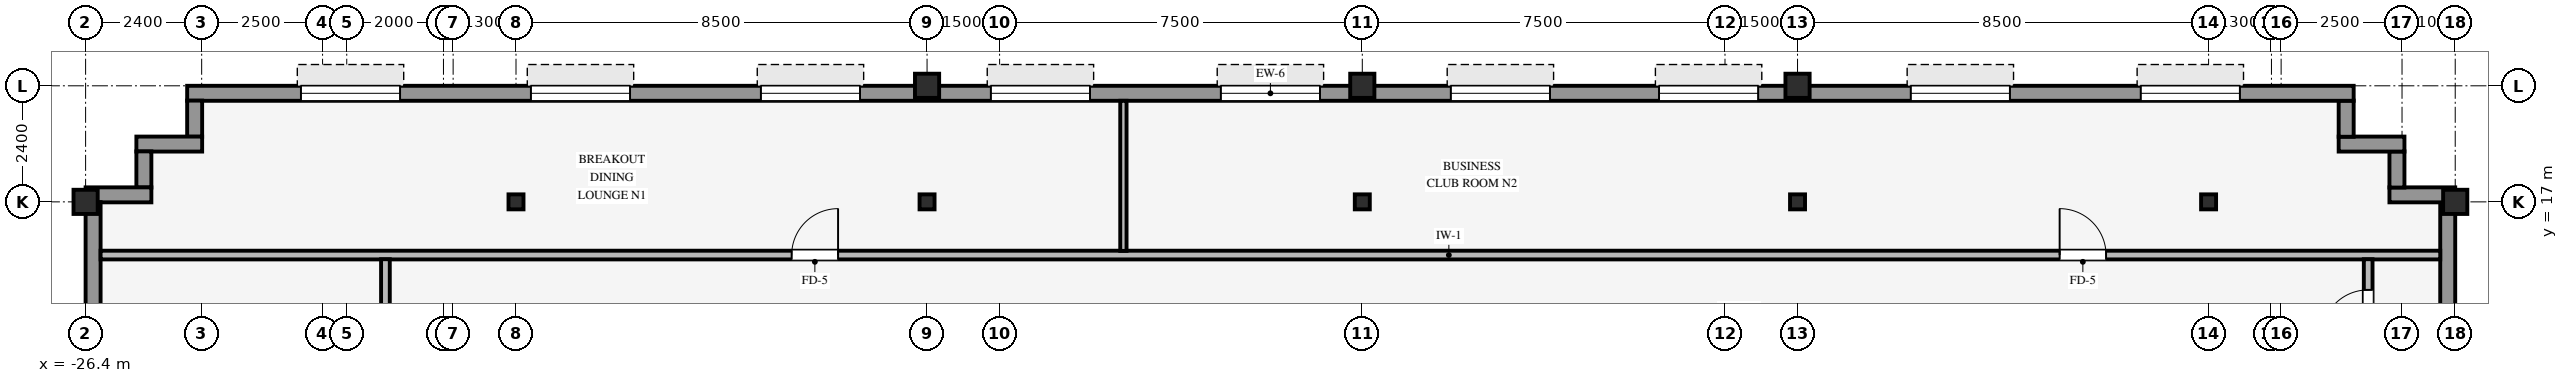
"""IFC4 building model, lengths in metres.
Left out: names, types, materials, properties, quantities, classifications, styles, units other than length and angle.
Written with IfcOpenShell. Run it as: python <this file> out.ifc"""

import sys

from ifc_helpers import new_model, si_unit, direction, frame, frame_2d, origin, origin_2d, place, context, subcontext, project, spatial, rectangle, hollow_rectangle, i_section, extrude, source, transform, mapped, element, fill, save


model = new_model("IFC4")
c1 = context("Model", 3, precision=1e-05, world=origin(), true_north=direction((0.0, 1.0)))
c2 = subcontext(c1, "Body", "Model", "MODEL_VIEW")
j1 = project(units=[si_unit("LENGTHUNIT", "METRE"), si_unit("PLANEANGLEUNIT", "RADIAN")], contexts=[c1])
p1 = place(None, origin())
s1 = spatial("IfcSite", under=j1, at=p1, CompositionType="ELEMENT")
p2 = place(p1, origin())
s2 = spatial("IfcBuilding", under=s1, at=p2, CompositionType="ELEMENT")
p3 = place(p2, frame((0.0, 0.0, 194.55)))
s3 = spatial("IfcBuildingStorey", under=s2, at=p3, CompositionType="ELEMENT", Elevation=194.55)
for number, where, z_axis, x_axis in (
    (1, (-26.4, 17.0, 0.0), (0.0, 0.0, 1.0), (1.0, 0.0, 0.0)),
    (2, (22.6, 17.0, 0.0), (0.0, 0.0, 1.0), (1.0, 0.0, 0.0)),
    (3, (-9.0, 19.4, 0.0), (0.0, 0.0, 1.0), (1.0, 0.0, 0.0)),
    (4, (0.0, 19.4, 0.0), (0.0, 0.0, 1.0), (1.0, 0.0, 0.0)),
    (5, (9.0, 19.4, 0.0), (0.0, 0.0, 1.0), (1.0, 0.0, 0.0)),
):
    element("IfcColumn", number, at=place(p3, frame(where, z_axis=z_axis, x_axis=x_axis)), inside=s3, PredefinedType="COLUMN", context=c2, shape_type="SweptSolid", body=[
        extrude(hollow_rectangle(XDim=0.5, YDim=0.5, WallThickness=0.032, InnerFilletRadius=0.032, OuterFilletRadius=0.064, at=origin_2d()), origin(), (0.0, 0.0, 1.0), 3.37),
    ])
for number, where, z_axis, x_axis in (
    (6, (0.0, 17.0, 0.0), (0.0, 0.0, 1.0), (1.0, 0.0, 0.0)),
    (7, (-17.5, 17.0, 0.0), (0.0, 0.0, 1.0), (1.0, 0.0, 0.0)),
    (8, (-9.0, 17.0, 0.0), (0.0, 0.0, 1.0), (1.0, 0.0, 0.0)),
    (9, (9.0, 17.0, 0.0), (0.0, 0.0, 1.0), (1.0, 0.0, 0.0)),
    (10, (17.5, 17.0, 0.0), (0.0, 0.0, 1.0), (1.0, 0.0, 0.0)),
):
    element("IfcColumn", number, at=place(p3, frame(where, z_axis=z_axis, x_axis=x_axis)), inside=s3, PredefinedType="COLUMN", context=c2, shape_type="SweptSolid", body=[
        extrude(i_section(OverallWidth=0.31, OverallDepth=0.31, WebThickness=0.015, FlangeThickness=0.015, FilletRadius=0.015, at=origin_2d()), origin(), (0.0, 0.0, 1.0), 3.37),
    ])
p4 = place(p3, frame((22.445, -20.794, 0.0), z_axis=(0.0, 0.0, 1.0), x_axis=(0.0, 1.0, 0.0)))
e11 = element("IfcWall", 11, at=p4, inside=s3, PredefinedType="STANDARD", context=c2, shape_type="SweptSolid", body=[
    extrude(rectangle(XDim=37.788, YDim=0.31, at=frame_2d((18.894, 0.0))), origin(), (0.0, 0.0, 1.0), 2.705),
])
p5 = place(p4, frame((16.474, 0.0, 0.0), z_axis=(0.0, 0.0, 1.0), x_axis=(-1.0, 0.0, 0.0)))
e12 = element("IfcOpeningElement", 12, at=p5, cuts=e11, PredefinedType="OPENING", context=c2, shape_type="SweptSolid", body=[
    extrude(rectangle(XDim=0.98, YDim=2.15, at=frame_2d((0.49, 1.075))), frame((0.0, 0.165, 0.0), z_axis=(0.0, -1.0, 0.0), x_axis=(1.0, 0.0, 0.0)), (0.0, 0.0, 1.0), 0.33),
])
p6 = place(p4, frame((1.581, 0.0, 0.8)))
e13 = element("IfcOpeningElement", 13, at=p6, cuts=e11, PredefinedType="OPENING", context=c2, shape_type="SweptSolid", body=[
    extrude(rectangle(XDim=1.25, YDim=1.52, at=frame_2d((0.625, 0.76))), frame((0.0, 0.165, 0.0), z_axis=(0.0, -1.0, 0.0), x_axis=(1.0, 0.0, 0.0)), (0.0, 0.0, 1.0), 0.33),
])
p7 = place(p4, frame((8.044, 0.0, 0.8)))
e14 = element("IfcOpeningElement", 14, at=p7, cuts=e11, PredefinedType="OPENING", context=c2, shape_type="SweptSolid", body=[
    extrude(rectangle(XDim=1.25, YDim=1.52, at=frame_2d((0.625, 0.76))), frame((0.0, 0.165, 0.0), z_axis=(0.0, -1.0, 0.0), x_axis=(1.0, 0.0, 0.0)), (0.0, 0.0, 1.0), 0.33),
])
p8 = place(p4, frame((13.156, 0.0, 0.8)))
e15 = element("IfcOpeningElement", 15, at=p8, cuts=e11, PredefinedType="OPENING", context=c2, shape_type="SweptSolid", body=[
    extrude(rectangle(XDim=1.25, YDim=1.52, at=frame_2d((0.625, 0.76))), frame((0.0, 0.165, 0.0), z_axis=(0.0, -1.0, 0.0), x_axis=(1.0, 0.0, 0.0)), (0.0, 0.0, 1.0), 0.33),
])
p9 = place(p4, frame((18.269, 0.0, 0.8)))
e16 = element("IfcOpeningElement", 16, at=p9, cuts=e11, PredefinedType="OPENING", context=c2, shape_type="SweptSolid", body=[
    extrude(rectangle(XDim=1.25, YDim=1.52, at=frame_2d((0.625, 0.76))), frame((0.0, 0.165, 0.0), z_axis=(0.0, -1.0, 0.0), x_axis=(1.0, 0.0, 0.0)), (0.0, 0.0, 1.0), 0.33),
])
p10 = place(p4, frame((22.482, 0.0, 0.8)))
e17 = element("IfcOpeningElement", 17, at=p10, cuts=e11, PredefinedType="OPENING", context=c2, shape_type="SweptSolid", body=[
    extrude(rectangle(XDim=1.25, YDim=1.52, at=frame_2d((0.625, 0.76))), frame((0.0, 0.165, 0.0), z_axis=(0.0, -1.0, 0.0), x_axis=(1.0, 0.0, 0.0)), (0.0, 0.0, 1.0), 0.33),
])
p11 = place(p4, frame((28.044, 0.0, 0.8)))
e18 = element("IfcOpeningElement", 18, at=p11, cuts=e11, PredefinedType="OPENING", context=c2, shape_type="SweptSolid", body=[
    extrude(rectangle(XDim=1.25, YDim=1.52, at=frame_2d((0.625, 0.76))), frame((0.0, 0.165, 0.0), z_axis=(0.0, -1.0, 0.0), x_axis=(1.0, 0.0, 0.0)), (0.0, 0.0, 1.0), 0.33),
])
p12 = place(p4, frame((33.607, 0.0, 0.8)))
e19 = element("IfcOpeningElement", 19, at=p12, cuts=e11, PredefinedType="OPENING", context=c2, shape_type="SweptSolid", body=[
    extrude(rectangle(XDim=1.25, YDim=1.52, at=frame_2d((0.625, 0.76))), frame((0.0, 0.165, 0.0), z_axis=(0.0, -1.0, 0.0), x_axis=(1.0, 0.0, 0.0)), (0.0, 0.0, 1.0), 0.33),
])
p13 = place(p3, frame((21.24, 17.145, 0.0), z_axis=(0.0, 0.0, 1.0), x_axis=(1.0, 0.0, 0.0)))
e20 = element("IfcWall", 20, at=p13, inside=s3, PredefinedType="STANDARD", context=c2, shape_type="SweptSolid", body=[
    extrude(rectangle(XDim=1.36, YDim=0.31, at=frame_2d((0.68, 0.0))), origin(), (0.0, 0.0, 1.0), 2.816),
])
p14 = place(p3, frame((21.395, 17.296, 0.0), z_axis=(0.0, 0.0, 1.0), x_axis=(0.0, 1.0, 0.0)))
e21 = element("IfcWall", 21, at=p14, inside=s3, PredefinedType="STANDARD", context=c2, shape_type="SweptSolid", body=[
    extrude(rectangle(XDim=0.748, YDim=0.31, at=frame_2d((0.374, 0.0))), origin(), (0.0, 0.0, 1.0), 2.816),
])
p15 = place(p3, frame((20.19, 18.195, 0.0), z_axis=(0.0, 0.0, 1.0), x_axis=(1.0, 0.0, 0.0)))
e22 = element("IfcWall", 22, at=p15, inside=s3, PredefinedType="STANDARD", context=c2, shape_type="SweptSolid", body=[
    extrude(rectangle(XDim=1.36, YDim=0.31, at=frame_2d((0.68, 0.0))), origin(), (0.0, 0.0, 1.0), 2.816),
])
p16 = place(p3, frame((20.345, 18.346, 0.0), z_axis=(0.0, 0.0, 1.0), x_axis=(0.0, 1.0, 0.0)))
e23 = element("IfcWall", 23, at=p16, inside=s3, PredefinedType="STANDARD", context=c2, shape_type="SweptSolid", body=[
    extrude(rectangle(XDim=0.748, YDim=0.31, at=frame_2d((0.374, 0.0))), origin(), (0.0, 0.0, 1.0), 2.816),
])
p17 = place(p3, frame((-24.3, 19.245, 0.0), z_axis=(0.0, 0.0, 1.0), x_axis=(1.0, 0.0, 0.0)))
e24 = element("IfcWall", 24, at=p17, inside=s3, PredefinedType="STANDARD", context=c2, shape_type="SweptSolid", body=[
    extrude(rectangle(XDim=44.8, YDim=0.31, at=frame_2d((22.4, 0.0))), origin(), (0.0, 0.0, 1.0), 2.705),
])
p18 = place(p17, frame((2.353, 0.0, 0.8)))
e25 = element("IfcOpeningElement", 25, at=p18, cuts=e24, PredefinedType="OPENING", context=c2, shape_type="SweptSolid", body=[
    extrude(rectangle(XDim=2.05, YDim=1.52, at=frame_2d((1.025, 0.76))), frame((0.0, 0.165, 0.0), z_axis=(0.0, -1.0, 0.0), x_axis=(1.0, 0.0, 0.0)), (0.0, 0.0, 1.0), 0.33),
])
p19 = place(p17, frame((7.108, 0.0, 0.8)))
e26 = element("IfcOpeningElement", 26, at=p19, cuts=e24, PredefinedType="OPENING", context=c2, shape_type="SweptSolid", body=[
    extrude(rectangle(XDim=2.05, YDim=1.52, at=frame_2d((1.025, 0.76))), frame((0.0, 0.165, 0.0), z_axis=(0.0, -1.0, 0.0), x_axis=(1.0, 0.0, 0.0)), (0.0, 0.0, 1.0), 0.33),
])
p20 = place(p17, frame((11.864, 0.0, 0.8)))
e27 = element("IfcOpeningElement", 27, at=p20, cuts=e24, PredefinedType="OPENING", context=c2, shape_type="SweptSolid", body=[
    extrude(rectangle(XDim=2.05, YDim=1.52, at=frame_2d((1.025, 0.76))), frame((0.0, 0.165, 0.0), z_axis=(0.0, -1.0, 0.0), x_axis=(1.0, 0.0, 0.0)), (0.0, 0.0, 1.0), 0.33),
])
p21 = place(p17, frame((16.619, 0.0, 0.8)))
e28 = element("IfcOpeningElement", 28, at=p21, cuts=e24, PredefinedType="OPENING", context=c2, shape_type="SweptSolid", body=[
    extrude(rectangle(XDim=2.05, YDim=1.52, at=frame_2d((1.025, 0.76))), frame((0.0, 0.165, 0.0), z_axis=(0.0, -1.0, 0.0), x_axis=(1.0, 0.0, 0.0)), (0.0, 0.0, 1.0), 0.33),
])
p22 = place(p17, frame((21.375, 0.0, 0.8)))
e29 = element("IfcOpeningElement", 29, at=p22, cuts=e24, PredefinedType="OPENING", context=c2, shape_type="SweptSolid", body=[
    extrude(rectangle(XDim=2.05, YDim=1.52, at=frame_2d((1.025, 0.76))), frame((0.0, 0.165, 0.0), z_axis=(0.0, -1.0, 0.0), x_axis=(1.0, 0.0, 0.0)), (0.0, 0.0, 1.0), 0.33),
])
p23 = place(p17, frame((26.131, 0.0, 0.8)))
e30 = element("IfcOpeningElement", 30, at=p23, cuts=e24, PredefinedType="OPENING", context=c2, shape_type="SweptSolid", body=[
    extrude(rectangle(XDim=2.05, YDim=1.52, at=frame_2d((1.025, 0.76))), frame((0.0, 0.165, 0.0), z_axis=(0.0, -1.0, 0.0), x_axis=(1.0, 0.0, 0.0)), (0.0, 0.0, 1.0), 0.33),
])
p24 = place(p17, frame((30.436, 0.0, 0.8)))
e31 = element("IfcOpeningElement", 31, at=p24, cuts=e24, PredefinedType="OPENING", context=c2, shape_type="SweptSolid", body=[
    extrude(rectangle(XDim=2.05, YDim=1.52, at=frame_2d((1.025, 0.76))), frame((0.0, 0.165, 0.0), z_axis=(0.0, -1.0, 0.0), x_axis=(1.0, 0.0, 0.0)), (0.0, 0.0, 1.0), 0.33),
])
p25 = place(p17, frame((35.642, 0.0, 0.8)))
e32 = element("IfcOpeningElement", 32, at=p25, cuts=e24, PredefinedType="OPENING", context=c2, shape_type="SweptSolid", body=[
    extrude(rectangle(XDim=2.05, YDim=1.52, at=frame_2d((1.025, 0.76))), frame((0.0, 0.165, 0.0), z_axis=(0.0, -1.0, 0.0), x_axis=(1.0, 0.0, 0.0)), (0.0, 0.0, 1.0), 0.33),
])
p26 = place(p17, frame((40.397, 0.0, 0.8)))
e33 = element("IfcOpeningElement", 33, at=p26, cuts=e24, PredefinedType="OPENING", context=c2, shape_type="SweptSolid", body=[
    extrude(rectangle(XDim=2.05, YDim=1.52, at=frame_2d((1.025, 0.76))), frame((0.0, 0.165, 0.0), z_axis=(0.0, -1.0, 0.0), x_axis=(1.0, 0.0, 0.0)), (0.0, 0.0, 1.0), 0.33),
])
p27 = place(p3, frame((-24.145, 18.346, 0.0), z_axis=(0.0, 0.0, 1.0), x_axis=(0.0, 1.0, 0.0)))
e34 = element("IfcWall", 34, at=p27, inside=s3, PredefinedType="STANDARD", context=c2, shape_type="SweptSolid", body=[
    extrude(rectangle(XDim=0.748, YDim=0.31, at=frame_2d((0.374, 0.0))), origin(), (0.0, 0.0, 1.0), 2.816),
])
p28 = place(p3, frame((-25.35, 18.195, 0.0), z_axis=(0.0, 0.0, 1.0), x_axis=(1.0, 0.0, 0.0)))
e35 = element("IfcWall", 35, at=p28, inside=s3, PredefinedType="STANDARD", context=c2, shape_type="SweptSolid", body=[
    extrude(rectangle(XDim=1.36, YDim=0.31, at=frame_2d((0.68, 0.0))), origin(), (0.0, 0.0, 1.0), 2.816),
])
p29 = place(p3, frame((-25.195, 17.296, 0.0), z_axis=(0.0, 0.0, 1.0), x_axis=(0.0, 1.0, 0.0)))
e36 = element("IfcWall", 36, at=p29, inside=s3, PredefinedType="STANDARD", context=c2, shape_type="SweptSolid", body=[
    extrude(rectangle(XDim=0.748, YDim=0.31, at=frame_2d((0.374, 0.0))), origin(), (0.0, 0.0, 1.0), 2.816),
])
p30 = place(p3, frame((-26.4, 17.145, 0.0), z_axis=(0.0, 0.0, 1.0), x_axis=(1.0, 0.0, 0.0)))
e37 = element("IfcWall", 37, at=p30, inside=s3, PredefinedType="STANDARD", context=c2, shape_type="SweptSolid", body=[
    extrude(rectangle(XDim=1.36, YDim=0.31, at=frame_2d((0.68, 0.0))), origin(), (0.0, 0.0, 1.0), 2.816),
])
p31 = place(p3, frame((-26.245, -20.794, 0.0), z_axis=(0.0, 0.0, 1.0), x_axis=(0.0, 1.0, 0.0)))
e38 = element("IfcWall", 38, at=p31, inside=s3, PredefinedType="STANDARD", context=c2, shape_type="SweptSolid", body=[
    extrude(rectangle(XDim=37.788, YDim=0.31, at=frame_2d((18.894, 0.0))), origin(), (0.0, 0.0, 1.0), 2.705),
])
p32 = place(p31, frame((24.744, 0.0, 0.0)))
e39 = element("IfcOpeningElement", 39, at=p32, cuts=e38, PredefinedType="OPENING", context=c2, shape_type="SweptSolid", body=[
    extrude(rectangle(XDim=1.05, YDim=2.1, at=frame_2d((0.525, 1.05))), frame((0.0, 0.165, 0.0), z_axis=(0.0, -1.0, 0.0), x_axis=(1.0, 0.0, 0.0)), (0.0, 0.0, 1.0), 0.33),
])
p33 = place(p31, frame((1.581, 0.0, 0.8)))
e40 = element("IfcOpeningElement", 40, at=p33, cuts=e38, PredefinedType="OPENING", context=c2, shape_type="SweptSolid", body=[
    extrude(rectangle(XDim=1.25, YDim=1.52, at=frame_2d((0.625, 0.76))), frame((0.0, 0.165, 0.0), z_axis=(0.0, -1.0, 0.0), x_axis=(1.0, 0.0, 0.0)), (0.0, 0.0, 1.0), 0.33),
])
p34 = place(p31, frame((8.044, 0.0, 0.8)))
e41 = element("IfcOpeningElement", 41, at=p34, cuts=e38, PredefinedType="OPENING", context=c2, shape_type="SweptSolid", body=[
    extrude(rectangle(XDim=1.25, YDim=1.52, at=frame_2d((0.625, 0.76))), frame((0.0, 0.165, 0.0), z_axis=(0.0, -1.0, 0.0), x_axis=(1.0, 0.0, 0.0)), (0.0, 0.0, 1.0), 0.33),
])
p35 = place(p31, frame((13.156, 0.0, 0.8)))
e42 = element("IfcOpeningElement", 42, at=p35, cuts=e38, PredefinedType="OPENING", context=c2, shape_type="SweptSolid", body=[
    extrude(rectangle(XDim=1.25, YDim=1.52, at=frame_2d((0.625, 0.76))), frame((0.0, 0.165, 0.0), z_axis=(0.0, -1.0, 0.0), x_axis=(1.0, 0.0, 0.0)), (0.0, 0.0, 1.0), 0.33),
])
p36 = place(p31, frame((18.269, 0.0, 0.8)))
e43 = element("IfcOpeningElement", 43, at=p36, cuts=e38, PredefinedType="OPENING", context=c2, shape_type="SweptSolid", body=[
    extrude(rectangle(XDim=1.25, YDim=1.52, at=frame_2d((0.625, 0.76))), frame((0.0, 0.165, 0.0), z_axis=(0.0, -1.0, 0.0), x_axis=(1.0, 0.0, 0.0)), (0.0, 0.0, 1.0), 0.33),
])
p37 = place(p31, frame((22.932, 0.0, 0.8)))
e44 = element("IfcOpeningElement", 44, at=p37, cuts=e38, PredefinedType="OPENING", context=c2, shape_type="SweptSolid", body=[
    extrude(rectangle(XDim=1.25, YDim=1.52, at=frame_2d((0.625, 0.76))), frame((0.0, 0.165, 0.0), z_axis=(0.0, -1.0, 0.0), x_axis=(1.0, 0.0, 0.0)), (0.0, 0.0, 1.0), 0.33),
])
p38 = place(p31, frame((28.044, 0.0, 0.8)))
e45 = element("IfcOpeningElement", 45, at=p38, cuts=e38, PredefinedType="OPENING", context=c2, shape_type="SweptSolid", body=[
    extrude(rectangle(XDim=1.25, YDim=1.52, at=frame_2d((0.625, 0.76))), frame((0.0, 0.165, 0.0), z_axis=(0.0, -1.0, 0.0), x_axis=(1.0, 0.0, 0.0)), (0.0, 0.0, 1.0), 0.33),
])
p39 = place(p31, frame((33.607, 0.0, 0.8)))
e46 = element("IfcOpeningElement", 46, at=p39, cuts=e38, PredefinedType="OPENING", context=c2, shape_type="SweptSolid", body=[
    extrude(rectangle(XDim=1.25, YDim=1.52, at=frame_2d((0.625, 0.76))), frame((0.0, 0.165, 0.0), z_axis=(0.0, -1.0, 0.0), x_axis=(1.0, 0.0, 0.0)), (0.0, 0.0, 1.0), 0.33),
])
p40 = place(p3, frame((-26.09, 15.9, 0.0), z_axis=(0.0, 0.0, 1.0), x_axis=(1.0, 0.0, 0.0)))
e47 = element("IfcWall", 47, at=p40, inside=s3, PredefinedType="PARTITIONING", context=c2, shape_type="SweptSolid", body=[
    extrude(rectangle(XDim=48.38, YDim=0.18, at=frame_2d((24.19, 0.0))), origin(), (0.0, 0.0, 1.0), 3.36),
])
p41 = place(p40, frame((14.29, 0.0, 0.0)))
e48 = element("IfcOpeningElement", 48, at=p41, cuts=e47, PredefinedType="OPENING", context=c2, shape_type="SweptSolid", body=[
    extrude(rectangle(XDim=0.96, YDim=2.1, at=frame_2d((0.48, 1.05))), frame((0.0, 0.1, 0.0), z_axis=(0.0, -1.0, 0.0), x_axis=(1.0, 0.0, 0.0)), (0.0, 0.0, 1.0), 0.2),
])
p42 = place(p40, frame((40.51, 0.0, 0.0)))
e49 = element("IfcOpeningElement", 49, at=p42, cuts=e47, PredefinedType="OPENING", context=c2, shape_type="SweptSolid", body=[
    extrude(rectangle(XDim=0.96, YDim=2.1, at=frame_2d((0.48, 1.05))), frame((0.0, 0.1, 0.0), z_axis=(0.0, -1.0, 0.0), x_axis=(1.0, 0.0, 0.0)), (0.0, 0.0, 1.0), 0.2),
])
p43 = place(p3, frame((-20.2, -15.814, 0.0), z_axis=(0.0, 0.0, 1.0), x_axis=(0.0, 1.0, 0.0)))
e50 = element("IfcWall", 50, at=p43, inside=s3, PredefinedType="PARTITIONING", context=c2, shape_type="SweptSolid", body=[
    extrude(rectangle(XDim=31.628, YDim=0.18, at=frame_2d((15.814, 0.0))), origin(), (0.0, 0.0, 1.0), 3.36),
])
p44 = place(p43, frame((15.334, 0.0, 0.0)))
e51 = element("IfcOpeningElement", 51, at=p44, cuts=e50, PredefinedType="OPENING", context=c2, shape_type="SweptSolid", body=[
    extrude(rectangle(XDim=0.96, YDim=2.1, at=frame_2d((0.48, 1.05))), frame((0.0, 0.1, 0.0), z_axis=(0.0, -1.0, 0.0), x_axis=(1.0, 0.0, 0.0)), (0.0, 0.0, 1.0), 0.2),
])
p45 = place(p43, frame((5.834, 0.0, 0.0)))
e52 = element("IfcOpeningElement", 52, at=p45, cuts=e50, PredefinedType="OPENING", context=c2, shape_type="SweptSolid", body=[
    extrude(rectangle(XDim=0.96, YDim=2.1, at=frame_2d((0.48, 1.05))), frame((0.0, 0.1, 0.0), z_axis=(0.0, -1.0, 0.0), x_axis=(1.0, 0.0, 0.0)), (0.0, 0.0, 1.0), 0.2),
])
p46 = place(p43, frame((24.834, 0.0, 0.0)))
e53 = element("IfcOpeningElement", 53, at=p46, cuts=e50, PredefinedType="OPENING", context=c2, shape_type="SweptSolid", body=[
    extrude(rectangle(XDim=0.96, YDim=2.1, at=frame_2d((0.48, 1.05))), frame((0.0, 0.1, 0.0), z_axis=(0.0, -1.0, 0.0), x_axis=(1.0, 0.0, 0.0)), (0.0, 0.0, 1.0), 0.2),
])
p47 = place(p3, frame((-4.94, 15.986, 0.0), z_axis=(0.0, 0.0, 1.0), x_axis=(0.0, 1.0, 0.0)))
e54 = element("IfcWall", 54, at=p47, inside=s3, PredefinedType="PARTITIONING", context=c2, shape_type="SweptSolid", body=[
    extrude(rectangle(XDim=3.104, YDim=0.13, at=frame_2d((1.552, 0.0))), origin(), (0.0, 0.0, 1.0), 3.36),
])
p48 = place(p3, frame((20.8, 13.586, 0.0), z_axis=(0.0, 0.0, 1.0), x_axis=(0.0, 1.0, 0.0)))
e55 = element("IfcWall", 55, at=p48, inside=s3, PredefinedType="PARTITIONING", context=c2, shape_type="SweptSolid", body=[
    extrude(rectangle(XDim=2.228, YDim=0.18, at=frame_2d((1.114, 0.0))), origin(), (0.0, 0.0, 1.0), 3.36),
])
p49 = place(p48, frame((0.634, 0.0, 0.0)))
e56 = element("IfcOpeningElement", 56, at=p49, cuts=e55, PredefinedType="OPENING", context=c2, shape_type="SweptSolid", body=[
    extrude(rectangle(XDim=0.96, YDim=2.1, at=frame_2d((0.48, 1.05))), frame((0.0, 0.1, 0.0), z_axis=(0.0, -1.0, 0.0), x_axis=(1.0, 0.0, 0.0)), (0.0, 0.0, 1.0), 0.2),
])
m1 = source(origin(), c2, "Body", "SweptSolid", [
    extrude(rectangle(XDim=2.05, YDim=1.52, at=frame_2d((1.025, 0.76))), frame((0.0, 0.03, 0.0), z_axis=(0.0, -1.0, 0.0), x_axis=(1.0, 0.0, 0.0)), (0.0, 0.0, 1.0), 0.06),
])
p50 = place(p18, origin())
e57 = element("IfcWindow", 57, at=p50, inside=s3, PartitioningType="SINGLE_PANEL", PredefinedType="WINDOW", context=c2, shape_type="MappedRepresentation", body=[
    mapped(m1, transform((0.0, 0.0, 0.0), scale=1.0)),
])
fill(e25, e57)
p51 = place(p19, origin())
e58 = element("IfcWindow", 58, at=p51, inside=s3, PartitioningType="SINGLE_PANEL", PredefinedType="WINDOW", context=c2, shape_type="MappedRepresentation", body=[
    mapped(m1, transform((0.0, 0.0, 0.0), scale=1.0)),
])
fill(e26, e58)
p52 = place(p20, origin())
e59 = element("IfcWindow", 59, at=p52, inside=s3, PartitioningType="SINGLE_PANEL", PredefinedType="WINDOW", context=c2, shape_type="MappedRepresentation", body=[
    mapped(m1, transform((0.0, 0.0, 0.0), scale=1.0)),
])
fill(e27, e59)
p53 = place(p21, origin())
e60 = element("IfcWindow", 60, at=p53, inside=s3, PartitioningType="SINGLE_PANEL", PredefinedType="WINDOW", context=c2, shape_type="MappedRepresentation", body=[
    mapped(m1, transform((0.0, 0.0, 0.0), scale=1.0)),
])
fill(e28, e60)
p54 = place(p22, origin())
e61 = element("IfcWindow", 61, at=p54, inside=s3, PartitioningType="SINGLE_PANEL", PredefinedType="WINDOW", context=c2, shape_type="MappedRepresentation", body=[
    mapped(m1, transform((0.0, 0.0, 0.0), scale=1.0)),
])
fill(e29, e61)
p55 = place(p23, origin())
e62 = element("IfcWindow", 62, at=p55, inside=s3, PartitioningType="SINGLE_PANEL", PredefinedType="WINDOW", context=c2, shape_type="MappedRepresentation", body=[
    mapped(m1, transform((0.0, 0.0, 0.0), scale=1.0)),
])
fill(e30, e62)
p56 = place(p24, origin())
e63 = element("IfcWindow", 63, at=p56, inside=s3, PartitioningType="SINGLE_PANEL", PredefinedType="WINDOW", context=c2, shape_type="MappedRepresentation", body=[
    mapped(m1, transform((0.0, 0.0, 0.0), scale=1.0)),
])
fill(e31, e63)
p57 = place(p25, origin())
e64 = element("IfcWindow", 64, at=p57, inside=s3, PartitioningType="SINGLE_PANEL", PredefinedType="WINDOW", context=c2, shape_type="MappedRepresentation", body=[
    mapped(m1, transform((0.0, 0.0, 0.0), scale=1.0)),
])
fill(e32, e64)
p58 = place(p26, origin())
e65 = element("IfcWindow", 65, at=p58, inside=s3, PartitioningType="SINGLE_PANEL", PredefinedType="WINDOW", context=c2, shape_type="MappedRepresentation", body=[
    mapped(m1, transform((0.0, 0.0, 0.0), scale=1.0)),
])
fill(e33, e65)
m2 = source(origin(), c2, "Body", "SweptSolid", [
    extrude(rectangle(XDim=0.96, YDim=2.1, at=frame_2d((0.48, 1.05))), frame((0.0, 0.025, 0.0), z_axis=(0.0, -1.0, 0.0), x_axis=(1.0, 0.0, 0.0)), (0.0, 0.0, 1.0), 0.05),
])
p59 = place(p41, origin())
e66 = element("IfcDoor", 66, at=p59, inside=s3, OperationType="SINGLE_SWING_RIGHT", PredefinedType="DOOR", context=c2, shape_type="MappedRepresentation", body=[
    mapped(m2, transform((0.0, 0.0, 0.0), scale=1.0)),
])
fill(e48, e66)
p60 = place(p42, origin())
e67 = element("IfcDoor", 67, at=p60, inside=s3, OperationType="SINGLE_SWING_LEFT", PredefinedType="DOOR", context=c2, shape_type="MappedRepresentation", body=[
    mapped(m2, transform((0.0, 0.0, 0.0), scale=1.0)),
])
fill(e49, e67)
p61 = place(p49, origin())
e68 = element("IfcDoor", 68, at=p61, inside=s3, OperationType="SINGLE_SWING_LEFT", PredefinedType="DOOR", context=c2, shape_type="MappedRepresentation", body=[
    mapped(m2, transform((0.0, 0.0, 0.0), scale=1.0)),
])
fill(e56, e68)
save(model, sys.argv[1])
